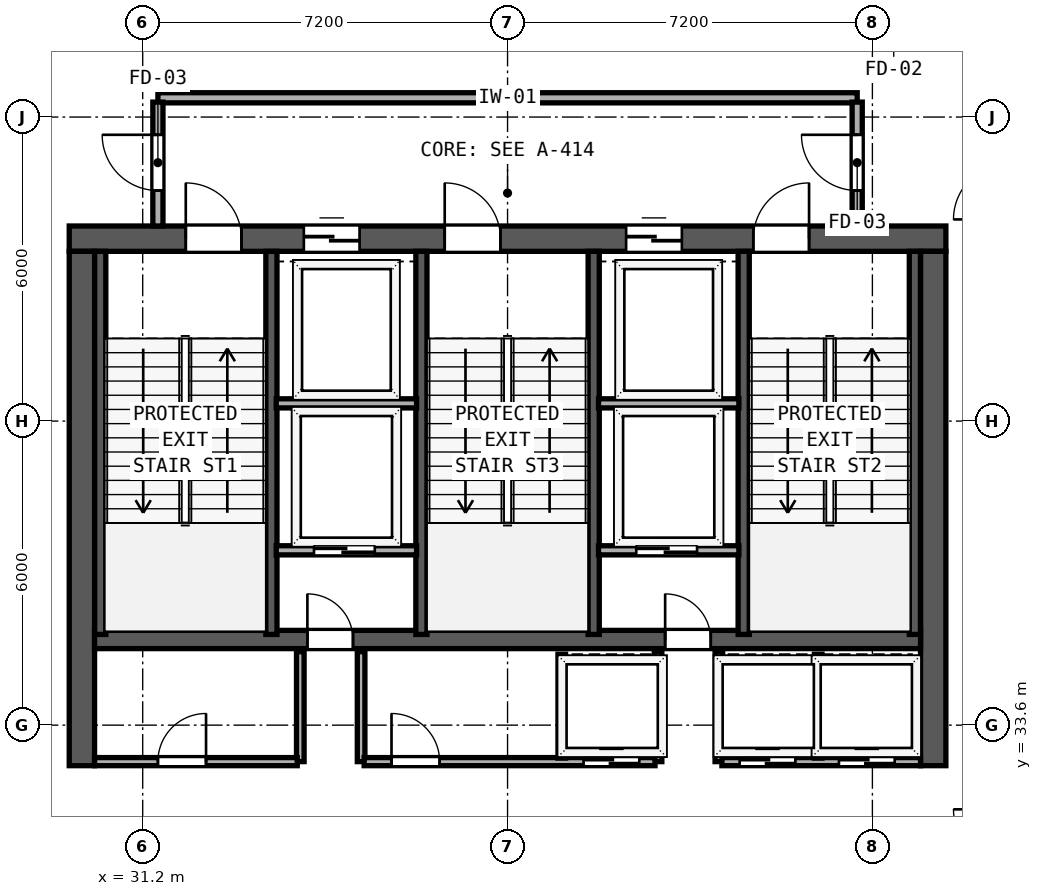
"""IFC4 building model, lengths in metres.
Left out: names, types, materials, properties, quantities, classifications, styles, units other than length and angle.
Written with IfcOpenShell. Run it as: python <this file> out.ifc"""

import sys

from ifc_helpers import new_model, si_unit, direction, frame, frame_2d, origin, place, context, subcontext, project, spatial, rectangle, extrude, element, fill, save


model = new_model("IFC4")
c1 = context("Model", 3, precision=1e-05, world=origin(), true_north=direction((0.0, 1.0)))
c2 = subcontext(c1, "Body", "Model", "MODEL_VIEW")
j1 = project(units=[si_unit("LENGTHUNIT", "METRE"), si_unit("PLANEANGLEUNIT", "RADIAN")], contexts=[c1])
p1 = place(None, origin())
s1 = spatial("IfcSite", under=j1, at=p1, CompositionType="ELEMENT")
p2 = place(p1, origin())
s2 = spatial("IfcBuilding", under=s1, at=p2, CompositionType="ELEMENT")
p3 = place(p2, frame((0.0, 0.0, 277.55)))
s3 = spatial("IfcBuildingStorey", under=s2, at=p3, CompositionType="ELEMENT", Elevation=277.55)
p4 = place(p3, frame((29.75, 43.2, 0.0), z_axis=(0.0, 0.0, 1.0), x_axis=(1.0, 0.0, 0.0)))
e1 = element("IfcWall", 1, at=p4, inside=s3, PredefinedType="SHEAR", context=c2, shape_type="SweptSolid", body=[
    extrude(rectangle(XDim=17.3, YDim=0.5, at=frame_2d((8.65, 0.0))), origin(), (0.0, 0.0, 1.0), 4.4),
])
p5 = place(p4, frame((2.3, 0.0, 0.0)))
e2 = element("IfcOpeningElement", 2, at=p5, cuts=e1, PredefinedType="OPENING", context=c2, shape_type="SweptSolid", body=[
    extrude(rectangle(XDim=1.1, YDim=2.15, at=frame_2d((0.55, 1.075))), frame((0.0, 0.26, 0.0), z_axis=(0.0, -1.0, 0.0), x_axis=(1.0, 0.0, 0.0)), (0.0, 0.0, 1.0), 0.52),
])
p6 = place(p4, frame((7.41, 0.0, 0.0)))
e3 = element("IfcOpeningElement", 3, at=p6, cuts=e1, PredefinedType="OPENING", context=c2, shape_type="SweptSolid", body=[
    extrude(rectangle(XDim=1.1, YDim=2.15, at=frame_2d((0.55, 1.075))), frame((0.0, 0.26, 0.0), z_axis=(0.0, -1.0, 0.0), x_axis=(1.0, 0.0, 0.0)), (0.0, 0.0, 1.0), 0.52),
])
p7 = place(p4, frame((13.5, 0.0, 0.0)))
e4 = element("IfcOpeningElement", 4, at=p7, cuts=e1, PredefinedType="OPENING", context=c2, shape_type="SweptSolid", body=[
    extrude(rectangle(XDim=1.1, YDim=2.15, at=frame_2d((0.55, 1.075))), frame((0.0, 0.26, 0.0), z_axis=(0.0, -1.0, 0.0), x_axis=(1.0, 0.0, 0.0)), (0.0, 0.0, 1.0), 0.52),
])
p8 = place(p4, frame((4.63, 0.0, 0.0)))
e5 = element("IfcOpeningElement", 5, at=p8, cuts=e1, PredefinedType="OPENING", context=c2, shape_type="SweptSolid", body=[
    extrude(rectangle(XDim=1.1, YDim=2.2, at=frame_2d((0.55, 1.1))), frame((0.0, 0.26, 0.0), z_axis=(0.0, -1.0, 0.0), x_axis=(1.0, 0.0, 0.0)), (0.0, 0.0, 1.0), 0.52),
])
p9 = place(p4, frame((10.99, 0.0, 0.0)))
e6 = element("IfcOpeningElement", 6, at=p9, cuts=e1, PredefinedType="OPENING", context=c2, shape_type="SweptSolid", body=[
    extrude(rectangle(XDim=1.1, YDim=2.2, at=frame_2d((0.55, 1.1))), frame((0.0, 0.26, 0.0), z_axis=(0.0, -1.0, 0.0), x_axis=(1.0, 0.0, 0.0)), (0.0, 0.0, 1.0), 0.52),
])
for number, where, z_axis, x_axis in (
    (7, (30.0, 32.8, 0.0), (0.0, 0.0, 1.0), (0.0, 1.0, 0.0)),
    (8, (46.8, 32.8, 0.0), (0.0, 0.0, 1.0), (0.0, 1.0, 0.0)),
):
    element("IfcWall", number, at=place(p3, frame(where, z_axis=z_axis, x_axis=x_axis)), inside=s3, PredefinedType="SHEAR", context=c2, shape_type="SweptSolid", body=[
        extrude(rectangle(XDim=10.15, YDim=0.5, at=frame_2d((5.075, 0.0))), origin(), (0.0, 0.0, 1.0), 4.4),
    ])
p10 = place(p3, frame((30.25, 35.29, 0.0), z_axis=(0.0, 0.0, 1.0), x_axis=(1.0, 0.0, 0.0)))
e9 = element("IfcWall", 9, at=p10, inside=s3, PredefinedType="SHEAR", context=c2, shape_type="SweptSolid", body=[
    extrude(rectangle(XDim=16.3, YDim=0.36, at=frame_2d((8.15, 0.0))), origin(), (0.0, 0.0, 1.0), 4.4),
])
p11 = place(p10, frame((5.1, 0.0, 0.0), z_axis=(0.0, 0.0, 1.0), x_axis=(-1.0, 0.0, 0.0)))
e10 = element("IfcOpeningElement", 10, at=p11, cuts=e9, PredefinedType="OPENING", context=c2, shape_type="SweptSolid", body=[
    extrude(rectangle(XDim=0.9, YDim=2.1, at=frame_2d((0.45, 1.05))), frame((0.0, 0.19, 0.0), z_axis=(0.0, -1.0, 0.0), x_axis=(1.0, 0.0, 0.0)), (0.0, 0.0, 1.0), 0.38),
])
p12 = place(p10, frame((12.16, 0.0, 0.0), z_axis=(0.0, 0.0, 1.0), x_axis=(-1.0, 0.0, 0.0)))
e11 = element("IfcOpeningElement", 11, at=p12, cuts=e9, PredefinedType="OPENING", context=c2, shape_type="SweptSolid", body=[
    extrude(rectangle(XDim=0.9, YDim=2.1, at=frame_2d((0.45, 1.05))), frame((0.0, 0.19, 0.0), z_axis=(0.0, -1.0, 0.0), x_axis=(1.0, 0.0, 0.0)), (0.0, 0.0, 1.0), 0.38),
])
for number, where, z_axis, x_axis in (
    (12, (30.362, 35.39, 0.0), (0.0, 0.0, 1.0), (0.0, 1.0, 0.0)),
    (13, (33.74, 35.39, 0.0), (0.0, 0.0, 1.0), (0.0, 1.0, 0.0)),
    (14, (36.7, 35.39, 0.0), (0.0, 0.0, 1.0), (0.0, 1.0, 0.0)),
    (15, (40.1, 35.39, 0.0), (0.0, 0.0, 1.0), (0.0, 1.0, 0.0)),
    (16, (43.06, 35.39, 0.0), (0.0, 0.0, 1.0), (0.0, 1.0, 0.0)),
    (17, (46.438, 35.39, 0.0), (0.0, 0.0, 1.0), (0.0, 1.0, 0.0)),
):
    element("IfcWall", number, at=place(p3, frame(where, z_axis=z_axis, x_axis=x_axis)), inside=s3, PredefinedType="SHEAR", context=c2, shape_type="SweptSolid", body=[
        extrude(rectangle(XDim=7.56, YDim=0.22, at=frame_2d((3.78, 0.0))), origin(), (0.0, 0.0, 1.0), 4.4),
    ])
p13 = place(p3, frame((31.5, 45.98, 0.0), z_axis=(0.0, 0.0, 1.0), x_axis=(1.0, 0.0, 0.0)))
e18 = element("IfcWall", 18, at=p13, inside=s3, PredefinedType="SOLIDWALL", context=c2, shape_type="SweptSolid", body=[
    extrude(rectangle(XDim=13.8, YDim=0.2, at=frame_2d((6.9, 0.0))), origin(), (0.0, 0.0, 1.0), 4.4),
])
p14 = place(p3, frame((31.5, 43.45, 0.0), z_axis=(0.0, 0.0, 1.0), x_axis=(0.0, 1.0, 0.0)))
e19 = element("IfcWall", 19, at=p14, inside=s3, PredefinedType="SOLIDWALL", context=c2, shape_type="SweptSolid", body=[
    extrude(rectangle(XDim=2.445, YDim=0.2, at=frame_2d((1.223, 0.0))), origin(), (0.0, 0.0, 1.0), 4.4),
])
p15 = place(p14, frame((1.8, 0.0, 0.0), z_axis=(0.0, 0.0, 1.0), x_axis=(-1.0, 0.0, 0.0)))
e20 = element("IfcOpeningElement", 20, at=p15, cuts=e19, PredefinedType="OPENING", context=c2, shape_type="SweptSolid", body=[
    extrude(rectangle(XDim=1.1, YDim=2.15, at=frame_2d((0.55, 1.075))), frame((0.0, 0.11, 0.0), z_axis=(0.0, -1.0, 0.0), x_axis=(1.0, 0.0, 0.0)), (0.0, 0.0, 1.0), 0.22),
])
p16 = place(p3, frame((45.3, 43.45, 0.0), z_axis=(0.0, 0.0, 1.0), x_axis=(0.0, 1.0, 0.0)))
e21 = element("IfcWall", 21, at=p16, inside=s3, PredefinedType="SOLIDWALL", context=c2, shape_type="SweptSolid", body=[
    extrude(rectangle(XDim=2.445, YDim=0.2, at=frame_2d((1.223, 0.0))), origin(), (0.0, 0.0, 1.0), 4.4),
])
p17 = place(p16, frame((0.7, 0.0, 0.0)))
e22 = element("IfcOpeningElement", 22, at=p17, cuts=e21, PredefinedType="OPENING", context=c2, shape_type="SweptSolid", body=[
    extrude(rectangle(XDim=1.1, YDim=2.15, at=frame_2d((0.55, 1.075))), frame((0.0, 0.11, 0.0), z_axis=(0.0, -1.0, 0.0), x_axis=(1.0, 0.0, 0.0)), (0.0, 0.0, 1.0), 0.22),
])
for number, where, z_axis, x_axis in (
    (23, (33.835, 39.95, 0.0), (0.0, 0.0, 1.0), (1.0, 0.0, 0.0)),
    (24, (40.195, 39.95, 0.0), (0.0, 0.0, 1.0), (1.0, 0.0, 0.0)),
):
    element("IfcWall", number, at=place(p3, frame(where, z_axis=z_axis, x_axis=x_axis)), inside=s3, PredefinedType="SOLIDWALL", context=c2, shape_type="SweptSolid", body=[
        extrude(rectangle(XDim=2.77, YDim=0.18, at=frame_2d((1.385, 0.0))), origin(), (0.0, 0.0, 1.0), 4.4),
    ])
p18 = place(p3, frame((33.835, 37.05, 0.0), z_axis=(0.0, 0.0, 1.0), x_axis=(1.0, 0.0, 0.0)))
e25 = element("IfcWall", 25, at=p18, inside=s3, PredefinedType="SOLIDWALL", context=c2, shape_type="SweptSolid", body=[
    extrude(rectangle(XDim=2.77, YDim=0.18, at=frame_2d((1.385, 0.0))), origin(), (0.0, 0.0, 1.0), 4.4),
])
p19 = place(p18, frame((1.945, 0.0, 0.0), z_axis=(0.0, 0.0, 1.0), x_axis=(-1.0, 0.0, 0.0)))
e26 = element("IfcOpeningElement", 26, at=p19, cuts=e25, PredefinedType="OPENING", context=c2, shape_type="SweptSolid", body=[
    extrude(rectangle(XDim=1.2, YDim=2.2, at=frame_2d((0.6, 1.1))), frame((0.0, 0.1, 0.0), z_axis=(0.0, -1.0, 0.0), x_axis=(1.0, 0.0, 0.0)), (0.0, 0.0, 1.0), 0.2),
])
for number, where, z_axis, x_axis in (
    (27, (34.31, 32.88, 0.0), (0.0, 0.0, 1.0), (0.0, 1.0, 0.0)),
    (28, (35.51, 32.88, 0.0), (0.0, 0.0, 1.0), (0.0, 1.0, 0.0)),
):
    element("IfcWall", number, at=place(p3, frame(where, z_axis=z_axis, x_axis=x_axis)), inside=s3, PredefinedType="SOLIDWALL", context=c2, shape_type="SweptSolid", body=[
        extrude(rectangle(XDim=2.17, YDim=0.15, at=frame_2d((1.085, 0.0))), origin(), (0.0, 0.0, 1.0), 4.4),
    ])
p20 = place(p3, frame((40.195, 37.05, 0.0), z_axis=(0.0, 0.0, 1.0), x_axis=(1.0, 0.0, 0.0)))
e29 = element("IfcWall", 29, at=p20, inside=s3, PredefinedType="SOLIDWALL", context=c2, shape_type="SweptSolid", body=[
    extrude(rectangle(XDim=2.77, YDim=0.18, at=frame_2d((1.385, 0.0))), origin(), (0.0, 0.0, 1.0), 4.4),
])
p21 = place(p20, frame((1.945, 0.0, 0.0), z_axis=(0.0, 0.0, 1.0), x_axis=(-1.0, 0.0, 0.0)))
e30 = element("IfcOpeningElement", 30, at=p21, cuts=e29, PredefinedType="OPENING", context=c2, shape_type="SweptSolid", body=[
    extrude(rectangle(XDim=1.2, YDim=2.2, at=frame_2d((0.6, 1.1))), frame((0.0, 0.1, 0.0), z_axis=(0.0, -1.0, 0.0), x_axis=(1.0, 0.0, 0.0)), (0.0, 0.0, 1.0), 0.2),
])
for number, where, z_axis, x_axis in (
    (31, (41.37, 32.88, 0.0), (0.0, 0.0, 1.0), (0.0, 1.0, 0.0)),
    (32, (42.57, 32.88, 0.0), (0.0, 0.0, 1.0), (0.0, 1.0, 0.0)),
):
    element("IfcWall", number, at=place(p3, frame(where, z_axis=z_axis, x_axis=x_axis)), inside=s3, PredefinedType="SOLIDWALL", context=c2, shape_type="SweptSolid", body=[
        extrude(rectangle(XDim=2.17, YDim=0.15, at=frame_2d((1.085, 0.0))), origin(), (0.0, 0.0, 1.0), 4.4),
    ])
p22 = place(p3, frame((30.25, 32.88, 0.0), z_axis=(0.0, 0.0, 1.0), x_axis=(1.0, 0.0, 0.0)))
e33 = element("IfcWall", 33, at=p22, inside=s3, PredefinedType="SOLIDWALL", context=c2, shape_type="SweptSolid", body=[
    extrude(rectangle(XDim=4.0, YDim=0.16, at=frame_2d((2.0, 0.0))), origin(), (0.0, 0.0, 1.0), 4.4),
])
p23 = place(p22, frame((2.2, 0.0, 0.0), z_axis=(0.0, 0.0, 1.0), x_axis=(-1.0, 0.0, 0.0)))
e34 = element("IfcOpeningElement", 34, at=p23, cuts=e33, PredefinedType="OPENING", context=c2, shape_type="SweptSolid", body=[
    extrude(rectangle(XDim=0.95, YDim=2.12, at=frame_2d((0.475, 1.06))), frame((0.0, 0.09, 0.0), z_axis=(0.0, -1.0, 0.0), x_axis=(1.0, 0.0, 0.0)), (0.0, 0.0, 1.0), 0.18),
])
p24 = place(p3, frame((35.57, 32.88, 0.0), z_axis=(0.0, 0.0, 1.0), x_axis=(1.0, 0.0, 0.0)))
e35 = element("IfcWall", 35, at=p24, inside=s3, PredefinedType="SOLIDWALL", context=c2, shape_type="SweptSolid", body=[
    extrude(rectangle(XDim=5.74, YDim=0.16, at=frame_2d((2.87, 0.0))), origin(), (0.0, 0.0, 1.0), 4.4),
])
p25 = place(p24, frame((1.49, 0.0, 0.0), z_axis=(0.0, 0.0, 1.0), x_axis=(-1.0, 0.0, 0.0)))
e36 = element("IfcOpeningElement", 36, at=p25, cuts=e35, PredefinedType="OPENING", context=c2, shape_type="SweptSolid", body=[
    extrude(rectangle(XDim=0.95, YDim=2.12, at=frame_2d((0.475, 1.06))), frame((0.0, 0.09, 0.0), z_axis=(0.0, -1.0, 0.0), x_axis=(1.0, 0.0, 0.0)), (0.0, 0.0, 1.0), 0.18),
])
p26 = place(p24, frame((5.43, 0.0, 0.0), z_axis=(0.0, 0.0, 1.0), x_axis=(-1.0, 0.0, 0.0)))
e37 = element("IfcOpeningElement", 37, at=p26, cuts=e35, PredefinedType="OPENING", context=c2, shape_type="SweptSolid", body=[
    extrude(rectangle(XDim=1.1, YDim=2.2, at=frame_2d((0.55, 1.1))), frame((0.0, 0.09, 0.0), z_axis=(0.0, -1.0, 0.0), x_axis=(1.0, 0.0, 0.0)), (0.0, 0.0, 1.0), 0.18),
])
p27 = place(p3, frame((42.63, 32.88, 0.0), z_axis=(0.0, 0.0, 1.0), x_axis=(1.0, 0.0, 0.0)))
e38 = element("IfcWall", 38, at=p27, inside=s3, PredefinedType="SOLIDWALL", context=c2, shape_type="SweptSolid", body=[
    extrude(rectangle(XDim=3.92, YDim=0.16, at=frame_2d((1.96, 0.0))), origin(), (0.0, 0.0, 1.0), 4.4),
])
p28 = place(p27, frame((1.45, 0.0, 0.0), z_axis=(0.0, 0.0, 1.0), x_axis=(-1.0, 0.0, 0.0)))
e39 = element("IfcOpeningElement", 39, at=p28, cuts=e38, PredefinedType="OPENING", context=c2, shape_type="SweptSolid", body=[
    extrude(rectangle(XDim=1.1, YDim=2.2, at=frame_2d((0.55, 1.1))), frame((0.0, 0.09, 0.0), z_axis=(0.0, -1.0, 0.0), x_axis=(1.0, 0.0, 0.0)), (0.0, 0.0, 1.0), 0.18),
])
p29 = place(p27, frame((3.41, 0.0, 0.0), z_axis=(0.0, 0.0, 1.0), x_axis=(-1.0, 0.0, 0.0)))
e40 = element("IfcOpeningElement", 40, at=p29, cuts=e38, PredefinedType="OPENING", context=c2, shape_type="SweptSolid", body=[
    extrude(rectangle(XDim=1.1, YDim=2.2, at=frame_2d((0.55, 1.1))), frame((0.0, 0.09, 0.0), z_axis=(0.0, -1.0, 0.0), x_axis=(1.0, 0.0, 0.0)), (0.0, 0.0, 1.0), 0.18),
])
for number, where, z_axis, x_axis in (
    (41, (39.47, 32.95, 0.0), (0.0, 0.0, 1.0), (0.0, 1.0, 0.0)),
    (42, (44.53, 32.95, 0.0), (0.0, 0.0, 1.0), (0.0, 1.0, 0.0)),
):
    element("IfcWall", number, at=place(p3, frame(where, z_axis=z_axis, x_axis=x_axis)), inside=s3, PredefinedType="SOLIDWALL", context=c2, shape_type="SweptSolid", body=[
        extrude(rectangle(XDim=2.05, YDim=0.15, at=frame_2d((1.025, 0.0))), origin(), (0.0, 0.0, 1.0), 4.4),
    ])
p30 = place(p5, origin())
e43 = element("IfcDoor", 43, at=p30, inside=s3, OperationType="SINGLE_SWING_LEFT", PredefinedType="DOOR", context=c2, shape_type="SweptSolid", body=[
    extrude(rectangle(XDim=1.1, YDim=2.15, at=frame_2d((0.55, 1.075))), frame((0.0, 0.185, 0.0), z_axis=(0.0, -1.0, 0.0), x_axis=(1.0, 0.0, 0.0)), (0.0, 0.0, 1.0), 0.05),
])
fill(e2, e43)
p31 = place(p6, origin())
e44 = element("IfcDoor", 44, at=p31, inside=s3, OperationType="SINGLE_SWING_LEFT", PredefinedType="DOOR", context=c2, shape_type="SweptSolid", body=[
    extrude(rectangle(XDim=1.1, YDim=2.15, at=frame_2d((0.55, 1.075))), frame((0.0, 0.185, 0.0), z_axis=(0.0, -1.0, 0.0), x_axis=(1.0, 0.0, 0.0)), (0.0, 0.0, 1.0), 0.05),
])
fill(e3, e44)
p32 = place(p7, origin())
e45 = element("IfcDoor", 45, at=p32, inside=s3, OperationType="SINGLE_SWING_RIGHT", PredefinedType="DOOR", context=c2, shape_type="SweptSolid", body=[
    extrude(rectangle(XDim=1.1, YDim=2.15, at=frame_2d((0.55, 1.075))), frame((0.0, 0.185, 0.0), z_axis=(0.0, -1.0, 0.0), x_axis=(1.0, 0.0, 0.0)), (0.0, 0.0, 1.0), 0.05),
])
fill(e4, e45)
p33 = place(p15, origin())
e46 = element("IfcDoor", 46, at=p33, inside=s3, OperationType="SINGLE_SWING_LEFT", PredefinedType="DOOR", context=c2, shape_type="SweptSolid", body=[
    extrude(rectangle(XDim=1.1, YDim=2.15, at=frame_2d((0.55, 1.075))), frame((0.0, 0.025, 0.0), z_axis=(0.0, -1.0, 0.0), x_axis=(1.0, 0.0, 0.0)), (0.0, 0.0, 1.0), 0.05),
])
fill(e20, e46)
p34 = place(p17, origin())
e47 = element("IfcDoor", 47, at=p34, inside=s3, OperationType="SINGLE_SWING_RIGHT", PredefinedType="DOOR", context=c2, shape_type="SweptSolid", body=[
    extrude(rectangle(XDim=1.1, YDim=2.15, at=frame_2d((0.55, 1.075))), frame((0.0, 0.025, 0.0), z_axis=(0.0, -1.0, 0.0), x_axis=(1.0, 0.0, 0.0)), (0.0, 0.0, 1.0), 0.05),
])
fill(e22, e47)
p35 = place(p8, origin())
e48 = element("IfcDoor", 48, at=p35, inside=s3, OperationType="SLIDING_TO_LEFT", PredefinedType="DOOR", context=c2, shape_type="SweptSolid", body=[
    extrude(rectangle(XDim=1.1, YDim=2.2, at=frame_2d((0.55, 1.1))), frame((0.0, 0.185, 0.0), z_axis=(0.0, -1.0, 0.0), x_axis=(1.0, 0.0, 0.0)), (0.0, 0.0, 1.0), 0.05),
])
fill(e5, e48)
p36 = place(p9, origin())
e49 = element("IfcDoor", 49, at=p36, inside=s3, OperationType="SLIDING_TO_LEFT", PredefinedType="DOOR", context=c2, shape_type="SweptSolid", body=[
    extrude(rectangle(XDim=1.1, YDim=2.2, at=frame_2d((0.55, 1.1))), frame((0.0, 0.185, 0.0), z_axis=(0.0, -1.0, 0.0), x_axis=(1.0, 0.0, 0.0)), (0.0, 0.0, 1.0), 0.05),
])
fill(e6, e49)
p37 = place(p19, origin())
e50 = element("IfcDoor", 50, at=p37, inside=s3, OperationType="SLIDING_TO_RIGHT", PredefinedType="DOOR", context=c2, shape_type="SweptSolid", body=[
    extrude(rectangle(XDim=1.2, YDim=2.2, at=frame_2d((0.6, 1.1))), frame((0.0, 0.025, 0.0), z_axis=(0.0, -1.0, 0.0), x_axis=(1.0, 0.0, 0.0)), (0.0, 0.0, 1.0), 0.05),
])
fill(e26, e50)
p38 = place(p11, origin())
e51 = element("IfcDoor", 51, at=p38, inside=s3, OperationType="SINGLE_SWING_RIGHT", PredefinedType="DOOR", context=c2, shape_type="SweptSolid", body=[
    extrude(rectangle(XDim=0.9, YDim=2.1, at=frame_2d((0.45, 1.05))), frame((0.0, 0.025, 0.0), z_axis=(0.0, -1.0, 0.0), x_axis=(1.0, 0.0, 0.0)), (0.0, 0.0, 1.0), 0.05),
])
fill(e10, e51)
p39 = place(p21, origin())
e52 = element("IfcDoor", 52, at=p39, inside=s3, OperationType="SLIDING_TO_RIGHT", PredefinedType="DOOR", context=c2, shape_type="SweptSolid", body=[
    extrude(rectangle(XDim=1.2, YDim=2.2, at=frame_2d((0.6, 1.1))), frame((0.0, 0.025, 0.0), z_axis=(0.0, -1.0, 0.0), x_axis=(1.0, 0.0, 0.0)), (0.0, 0.0, 1.0), 0.05),
])
fill(e30, e52)
p40 = place(p12, origin())
e53 = element("IfcDoor", 53, at=p40, inside=s3, OperationType="SINGLE_SWING_RIGHT", PredefinedType="DOOR", context=c2, shape_type="SweptSolid", body=[
    extrude(rectangle(XDim=0.9, YDim=2.1, at=frame_2d((0.45, 1.05))), frame((0.0, 0.025, 0.0), z_axis=(0.0, -1.0, 0.0), x_axis=(1.0, 0.0, 0.0)), (0.0, 0.0, 1.0), 0.05),
])
fill(e11, e53)
p41 = place(p23, origin())
e54 = element("IfcDoor", 54, at=p41, inside=s3, OperationType="SINGLE_SWING_LEFT", PredefinedType="DOOR", context=c2, shape_type="SweptSolid", body=[
    extrude(rectangle(XDim=0.95, YDim=2.12, at=frame_2d((0.475, 1.06))), frame((0.0, 0.025, 0.0), z_axis=(0.0, -1.0, 0.0), x_axis=(1.0, 0.0, 0.0)), (0.0, 0.0, 1.0), 0.05),
])
fill(e34, e54)
p42 = place(p25, origin())
e55 = element("IfcDoor", 55, at=p42, inside=s3, OperationType="SINGLE_SWING_RIGHT", PredefinedType="DOOR", context=c2, shape_type="SweptSolid", body=[
    extrude(rectangle(XDim=0.95, YDim=2.12, at=frame_2d((0.475, 1.06))), frame((0.0, 0.025, 0.0), z_axis=(0.0, -1.0, 0.0), x_axis=(1.0, 0.0, 0.0)), (0.0, 0.0, 1.0), 0.05),
])
fill(e36, e55)
p43 = place(p26, origin())
e56 = element("IfcDoor", 56, at=p43, inside=s3, OperationType="SLIDING_TO_RIGHT", PredefinedType="DOOR", context=c2, shape_type="SweptSolid", body=[
    extrude(rectangle(XDim=1.1, YDim=2.2, at=frame_2d((0.55, 1.1))), frame((0.0, 0.025, 0.0), z_axis=(0.0, -1.0, 0.0), x_axis=(1.0, 0.0, 0.0)), (0.0, 0.0, 1.0), 0.05),
])
fill(e37, e56)
p44 = place(p28, origin())
e57 = element("IfcDoor", 57, at=p44, inside=s3, OperationType="SLIDING_TO_RIGHT", PredefinedType="DOOR", context=c2, shape_type="SweptSolid", body=[
    extrude(rectangle(XDim=1.1, YDim=2.2, at=frame_2d((0.55, 1.1))), frame((0.0, 0.025, 0.0), z_axis=(0.0, -1.0, 0.0), x_axis=(1.0, 0.0, 0.0)), (0.0, 0.0, 1.0), 0.05),
])
fill(e39, e57)
p45 = place(p29, origin())
e58 = element("IfcDoor", 58, at=p45, inside=s3, OperationType="SLIDING_TO_RIGHT", PredefinedType="DOOR", context=c2, shape_type="SweptSolid", body=[
    extrude(rectangle(XDim=1.1, YDim=2.2, at=frame_2d((0.55, 1.1))), frame((0.0, 0.025, 0.0), z_axis=(0.0, -1.0, 0.0), x_axis=(1.0, 0.0, 0.0)), (0.0, 0.0, 1.0), 0.05),
])
fill(e40, e58)
save(model, sys.argv[1])
